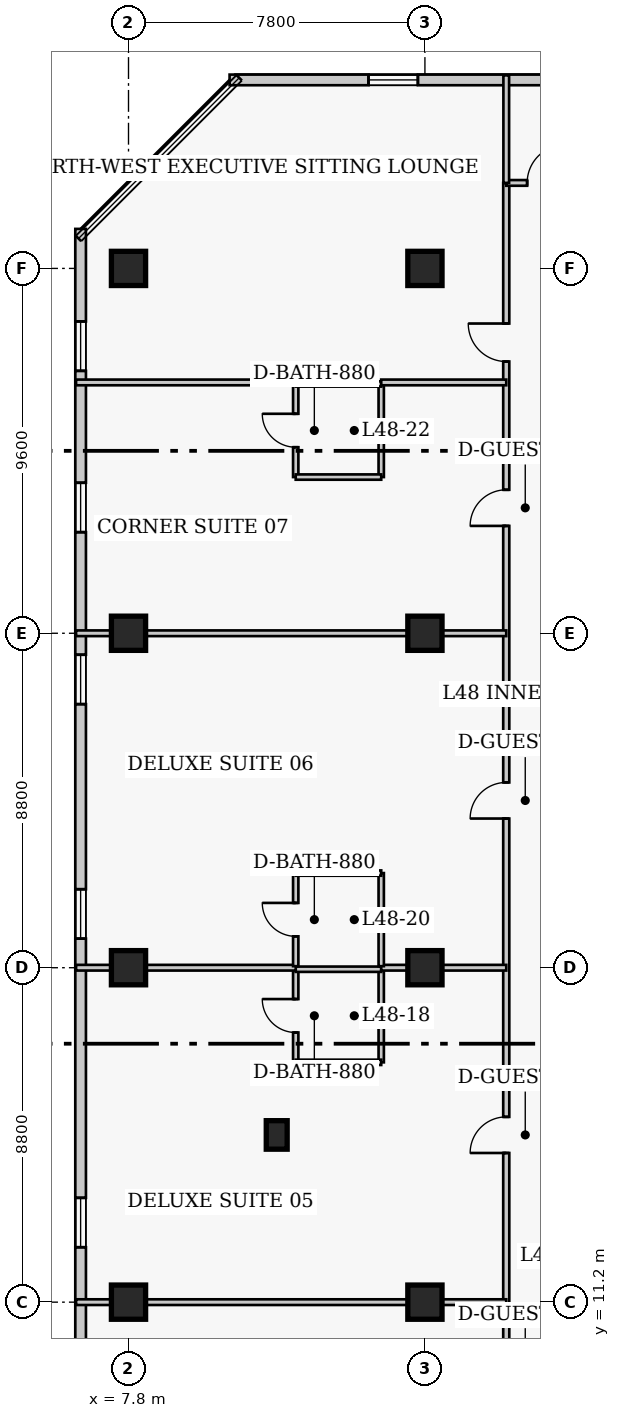
"""IFC4 building model, lengths in metres.
Left out: names, types, materials, properties, quantities, classifications, styles, units other than length and angle.
Written with IfcOpenShell. Run it as: python <this file> out.ifc"""

import sys

from ifc_helpers import new_model, si_unit, direction, frame, frame_2d, origin, origin_2d, place, context, subcontext, project, spatial, rectangle, extrude, element, fill, save


model = new_model("IFC4")
c1 = context("Model", 3, precision=1e-05, world=origin(), true_north=direction((0.0, 1.0)))
c2 = subcontext(c1, "Body", "Model", "MODEL_VIEW")
j1 = project(units=[si_unit("LENGTHUNIT", "METRE"), si_unit("PLANEANGLEUNIT", "RADIAN")], contexts=[c1])
p1 = place(None, origin())
s1 = spatial("IfcSite", under=j1, at=p1, CompositionType="ELEMENT")
p2 = place(p1, origin())
s2 = spatial("IfcBuilding", under=s1, at=p2, CompositionType="ELEMENT")
p3 = place(p2, frame((0.0, 0.0, 192.9)))
s3 = spatial("IfcBuildingStorey", under=s2, at=p3, CompositionType="ELEMENT", Elevation=192.9)
for number, where, z_axis, x_axis in (
    (1, (7.8, 11.2, 0.0), (0.0, 0.0, 1.0), (1.0, 0.0, 0.0)),
    (2, (7.8, 20.0, 0.0), (0.0, 0.0, 1.0), (1.0, 0.0, 0.0)),
    (3, (7.8, 28.8, 0.0), (0.0, 0.0, 1.0), (1.0, 0.0, 0.0)),
    (4, (7.8, 38.4, 0.0), (0.0, 0.0, 1.0), (1.0, 0.0, 0.0)),
    (5, (15.6, 11.2, 0.0), (0.0, 0.0, 1.0), (1.0, 0.0, 0.0)),
    (6, (15.6, 20.0, 0.0), (0.0, 0.0, 1.0), (1.0, 0.0, 0.0)),
    (7, (15.6, 28.8, 0.0), (0.0, 0.0, 1.0), (1.0, 0.0, 0.0)),
    (8, (15.6, 38.4, 0.0), (0.0, 0.0, 1.0), (1.0, 0.0, 0.0)),
):
    element("IfcColumn", number, at=place(p3, frame(where, z_axis=z_axis, x_axis=x_axis)), inside=s3, PredefinedType="COLUMN", context=c2, shape_type="SweptSolid", body=[
        extrude(rectangle(XDim=0.9, YDim=0.9, at=origin_2d()), origin(), (0.0, 0.0, 1.0), 3.9),
    ])
p4 = place(p3, frame((11.7, 15.6, 0.0), z_axis=(0.0, 0.0, 1.0), x_axis=(1.0, 0.0, 0.0)))
e9 = element("IfcColumn", 9, at=p4, inside=s3, PredefinedType="PILASTER", context=c2, shape_type="SweptSolid", body=[
    extrude(rectangle(XDim=0.55, YDim=0.75, at=origin_2d()), origin(), (0.0, 0.0, 1.0), 3.9),
])
p5 = place(p3, frame((36.29, 43.36, 0.0), z_axis=(0.0, 0.0, 1.0), x_axis=(-1.0, 0.0, 0.0)))
e10 = element("IfcWall", 10, at=p5, inside=s3, PredefinedType="SOLIDWALL", context=c2, shape_type="SweptSolid", body=[
    extrude(rectangle(XDim=25.83, YDim=0.28, at=frame_2d((12.915, 0.0))), origin(), (0.0, 0.0, 1.0), 3.65),
])
p6 = place(p5, frame((3.005, 0.0, 0.85)))
e11 = element("IfcOpeningElement", 11, at=p6, cuts=e10, PredefinedType="OPENING", context=c2, shape_type="SweptSolid", body=[
    extrude(rectangle(XDim=1.3, YDim=1.7, at=frame_2d((0.65, 0.85))), frame((0.0, 0.15, 0.0), z_axis=(0.0, -1.0, 0.0), x_axis=(1.0, 0.0, 0.0)), (0.0, 0.0, 1.0), 0.3),
])
p7 = place(p5, frame((12.265, 0.0, 0.85)))
e12 = element("IfcOpeningElement", 12, at=p7, cuts=e10, PredefinedType="OPENING", context=c2, shape_type="SweptSolid", body=[
    extrude(rectangle(XDim=1.3, YDim=1.7, at=frame_2d((0.65, 0.85))), frame((0.0, 0.15, 0.0), z_axis=(0.0, -1.0, 0.0), x_axis=(1.0, 0.0, 0.0)), (0.0, 0.0, 1.0), 0.3),
])
p8 = place(p5, frame((20.875, 0.0, 0.85)))
e13 = element("IfcOpeningElement", 13, at=p8, cuts=e10, PredefinedType="OPENING", context=c2, shape_type="SweptSolid", body=[
    extrude(rectangle(XDim=1.3, YDim=1.7, at=frame_2d((0.65, 0.85))), frame((0.0, 0.15, 0.0), z_axis=(0.0, -1.0, 0.0), x_axis=(1.0, 0.0, 0.0)), (0.0, 0.0, 1.0), 0.3),
])
p9 = place(p3, frame((6.54, 39.44, 0.0), z_axis=(0.0, 0.0, 1.0), x_axis=(0.0, -1.0, 0.0)))
e14 = element("IfcWall", 14, at=p9, inside=s3, PredefinedType="SOLIDWALL", context=c2, shape_type="SweptSolid", body=[
    extrude(rectangle(XDim=29.88, YDim=0.28, at=frame_2d((14.94, 0.0))), origin(), (0.0, 0.0, 1.0), 3.65),
])
p10 = place(p9, frame((2.435, 0.0, 0.85)))
e15 = element("IfcOpeningElement", 15, at=p10, cuts=e14, PredefinedType="OPENING", context=c2, shape_type="SweptSolid", body=[
    extrude(rectangle(XDim=1.3, YDim=1.7, at=frame_2d((0.65, 0.85))), frame((0.0, 0.15, 0.0), z_axis=(0.0, -1.0, 0.0), x_axis=(1.0, 0.0, 0.0)), (0.0, 0.0, 1.0), 0.3),
])
p11 = place(p9, frame((11.205, 0.0, 0.85)))
e16 = element("IfcOpeningElement", 16, at=p11, cuts=e14, PredefinedType="OPENING", context=c2, shape_type="SweptSolid", body=[
    extrude(rectangle(XDim=1.3, YDim=1.7, at=frame_2d((0.65, 0.85))), frame((0.0, 0.15, 0.0), z_axis=(0.0, -1.0, 0.0), x_axis=(1.0, 0.0, 0.0)), (0.0, 0.0, 1.0), 0.3),
])
p12 = place(p9, frame((17.375, 0.0, 0.85)))
e17 = element("IfcOpeningElement", 17, at=p12, cuts=e14, PredefinedType="OPENING", context=c2, shape_type="SweptSolid", body=[
    extrude(rectangle(XDim=1.3, YDim=1.7, at=frame_2d((0.65, 0.85))), frame((0.0, 0.15, 0.0), z_axis=(0.0, -1.0, 0.0), x_axis=(1.0, 0.0, 0.0)), (0.0, 0.0, 1.0), 0.3),
])
p13 = place(p9, frame((25.495, 0.0, 0.85)))
e18 = element("IfcOpeningElement", 18, at=p13, cuts=e14, PredefinedType="OPENING", context=c2, shape_type="SweptSolid", body=[
    extrude(rectangle(XDim=1.3, YDim=1.7, at=frame_2d((0.65, 0.85))), frame((0.0, 0.15, 0.0), z_axis=(0.0, -1.0, 0.0), x_axis=(1.0, 0.0, 0.0)), (0.0, 0.0, 1.0), 0.3),
])
p14 = place(p9, frame((6.68, 0.0, 0.85)))
e19 = element("IfcOpeningElement", 19, at=p14, cuts=e14, PredefinedType="OPENING", context=c2, shape_type="SweptSolid", body=[
    extrude(rectangle(XDim=1.3, YDim=1.7, at=frame_2d((0.65, 0.85))), frame((0.0, 0.15, 0.0), z_axis=(0.0, -1.0, 0.0), x_axis=(1.0, 0.0, 0.0)), (0.0, 0.0, 1.0), 0.3),
])
p15 = place(p3, frame((17.74, 7.55, 0.0), z_axis=(0.0, 0.0, 1.0), x_axis=(0.0, 1.0, 0.0)))
e20 = element("IfcWall", 20, at=p15, inside=s3, PredefinedType="PARTITIONING", context=c2, shape_type="SweptSolid", body=[
    extrude(rectangle(XDim=33.1, YDim=0.16, at=frame_2d((16.55, 0.0))), origin(), (0.0, 0.0, 1.0), 3.65),
])
p16 = place(p15, frame((1.35, 0.0, 0.0)))
e21 = element("IfcOpeningElement", 21, at=p16, cuts=e20, PredefinedType="OPENING", context=c2, shape_type="SweptSolid", body=[
    extrude(rectangle(XDim=0.95, YDim=2.1, at=frame_2d((0.475, 1.05))), frame((0.0, 0.09, 0.0), z_axis=(0.0, -1.0, 0.0), x_axis=(1.0, 0.0, 0.0)), (0.0, 0.0, 1.0), 0.18),
])
p17 = place(p15, frame((7.575, 0.0, 0.0)))
e22 = element("IfcOpeningElement", 22, at=p17, cuts=e20, PredefinedType="OPENING", context=c2, shape_type="SweptSolid", body=[
    extrude(rectangle(XDim=0.95, YDim=2.1, at=frame_2d((0.475, 1.05))), frame((0.0, 0.09, 0.0), z_axis=(0.0, -1.0, 0.0), x_axis=(1.0, 0.0, 0.0)), (0.0, 0.0, 1.0), 0.18),
])
p18 = place(p15, frame((16.375, 0.0, 0.0)))
e23 = element("IfcOpeningElement", 23, at=p18, cuts=e20, PredefinedType="OPENING", context=c2, shape_type="SweptSolid", body=[
    extrude(rectangle(XDim=0.95, YDim=2.1, at=frame_2d((0.475, 1.05))), frame((0.0, 0.09, 0.0), z_axis=(0.0, -1.0, 0.0), x_axis=(1.0, 0.0, 0.0)), (0.0, 0.0, 1.0), 0.18),
])
p19 = place(p15, frame((24.075, 0.0, 0.0)))
e24 = element("IfcOpeningElement", 24, at=p19, cuts=e20, PredefinedType="OPENING", context=c2, shape_type="SweptSolid", body=[
    extrude(rectangle(XDim=0.95, YDim=2.1, at=frame_2d((0.475, 1.05))), frame((0.0, 0.09, 0.0), z_axis=(0.0, -1.0, 0.0), x_axis=(1.0, 0.0, 0.0)), (0.0, 0.0, 1.0), 0.18),
])
p20 = place(p15, frame((28.4, 0.0, 0.0)))
e25 = element("IfcOpeningElement", 25, at=p20, cuts=e20, PredefinedType="OPENING", context=c2, shape_type="SweptSolid", body=[
    extrude(rectangle(XDim=1.0, YDim=2.15, at=frame_2d((0.5, 1.075))), frame((0.0, 0.09, 0.0), z_axis=(0.0, -1.0, 0.0), x_axis=(1.0, 0.0, 0.0)), (0.0, 0.0, 1.0), 0.18),
])
p21 = place(p3, frame((17.74, 40.65, 0.0), z_axis=(0.0, 0.0, 1.0), x_axis=(1.0, 0.0, 0.0)))
e26 = element("IfcWall", 26, at=p21, inside=s3, PredefinedType="PARTITIONING", context=c2, shape_type="SweptSolid", body=[
    extrude(rectangle(XDim=4.36, YDim=0.15, at=frame_2d((2.18, 0.0))), origin(), (0.0, 0.0, 1.0), 3.65),
])
p22 = place(p21, frame((0.55, 0.0, 0.0)))
e27 = element("IfcOpeningElement", 27, at=p22, cuts=e26, PredefinedType="OPENING", context=c2, shape_type="SweptSolid", body=[
    extrude(rectangle(XDim=1.0, YDim=2.15, at=frame_2d((0.5, 1.075))), frame((0.0, 0.085, 0.0), z_axis=(0.0, -1.0, 0.0), x_axis=(1.0, 0.0, 0.0)), (0.0, 0.0, 1.0), 0.17),
])
p23 = place(p3, frame((17.74, 40.65, 0.0), z_axis=(0.0, 0.0, 1.0), x_axis=(0.0, 1.0, 0.0)))
e28 = element("IfcWall", 28, at=p23, inside=s3, PredefinedType="PARTITIONING", context=c2, shape_type="SweptSolid", body=[
    extrude(rectangle(XDim=2.83, YDim=0.15, at=frame_2d((1.415, 0.0))), origin(), (0.0, 0.0, 1.0), 3.65),
])
p24 = place(p3, frame((6.42, 11.2, 0.0), z_axis=(0.0, 0.0, 1.0), x_axis=(1.0, 0.0, 0.0)))
e29 = element("IfcWall", 29, at=p24, inside=s3, PredefinedType="PARTITIONING", context=c2, shape_type="SweptSolid", body=[
    extrude(rectangle(XDim=11.32, YDim=0.15, at=frame_2d((5.66, 0.0))), origin(), (0.0, 0.0, 1.0), 2.878),
])
p25 = place(p3, frame((12.2, 17.51, 0.0), z_axis=(0.0, 0.0, 1.0), x_axis=(0.0, 1.0, 0.0)))
e30 = element("IfcWall", 30, at=p25, inside=s3, PredefinedType="PLUMBINGWALL", context=c2, shape_type="SweptSolid", body=[
    extrude(rectangle(XDim=2.45, YDim=0.14, at=frame_2d((1.225, 0.0))), origin(), (0.0, 0.0, 1.0), 3.65),
])
p26 = place(p25, frame((0.785, 0.0, 0.0)))
e31 = element("IfcOpeningElement", 31, at=p26, cuts=e30, PredefinedType="OPENING", context=c2, shape_type="SweptSolid", body=[
    extrude(rectangle(XDim=0.88, YDim=2.05, at=frame_2d((0.44, 1.025))), frame((0.0, 0.08, 0.0), z_axis=(0.0, -1.0, 0.0), x_axis=(1.0, 0.0, 0.0)), (0.0, 0.0, 1.0), 0.16),
])
p27 = place(p3, frame((14.45, 17.51, 0.0), z_axis=(0.0, 0.0, 1.0), x_axis=(0.0, 1.0, 0.0)))
e32 = element("IfcWall", 32, at=p27, inside=s3, PredefinedType="PLUMBINGWALL", context=c2, shape_type="SweptSolid", body=[
    extrude(rectangle(XDim=2.45, YDim=0.14, at=frame_2d((1.225, 0.0))), origin(), (0.0, 0.0, 1.0), 3.65),
])
p28 = place(p3, frame((12.2, 17.51, 0.0), z_axis=(0.0, 0.0, 1.0), x_axis=(1.0, 0.0, 0.0)))
e33 = element("IfcWall", 33, at=p28, inside=s3, PredefinedType="PLUMBINGWALL", context=c2, shape_type="SweptSolid", body=[
    extrude(rectangle(XDim=2.25, YDim=0.14, at=frame_2d((1.125, 0.0))), origin(), (0.0, 0.0, 1.0), 3.65),
])
p29 = place(p3, frame((12.2, 19.96, 0.0), z_axis=(0.0, 0.0, 1.0), x_axis=(1.0, 0.0, 0.0)))
e34 = element("IfcWall", 34, at=p29, inside=s3, PredefinedType="PLUMBINGWALL", context=c2, shape_type="SweptSolid", body=[
    extrude(rectangle(XDim=2.25, YDim=0.14, at=frame_2d((1.125, 0.0))), origin(), (0.0, 0.0, 1.0), 3.038),
])
p30 = place(p3, frame((6.42, 20.0, 0.0), z_axis=(0.0, 0.0, 1.0), x_axis=(1.0, 0.0, 0.0)))
e35 = element("IfcWall", 35, at=p30, inside=s3, PredefinedType="PARTITIONING", context=c2, shape_type="SweptSolid", body=[
    extrude(rectangle(XDim=5.78, YDim=0.15, at=frame_2d((2.89, 0.0))), origin(), (0.0, 0.0, 1.0), 2.878),
])
p31 = place(p3, frame((14.45, 20.0, 0.0), z_axis=(0.0, 0.0, 1.0), x_axis=(1.0, 0.0, 0.0)))
e36 = element("IfcWall", 36, at=p31, inside=s3, PredefinedType="PARTITIONING", context=c2, shape_type="SweptSolid", body=[
    extrude(rectangle(XDim=3.29, YDim=0.15, at=frame_2d((1.645, 0.0))), origin(), (0.0, 0.0, 1.0), 2.878),
])
p32 = place(p3, frame((12.2, 20.04, 0.0), z_axis=(0.0, 0.0, 1.0), x_axis=(0.0, 1.0, 0.0)))
e37 = element("IfcWall", 37, at=p32, inside=s3, PredefinedType="PLUMBINGWALL", context=c2, shape_type="SweptSolid", body=[
    extrude(rectangle(XDim=2.45, YDim=0.14, at=frame_2d((1.225, 0.0))), origin(), (0.0, 0.0, 1.0), 3.65),
])
p33 = place(p32, frame((0.785, 0.0, 0.0)))
e38 = element("IfcOpeningElement", 38, at=p33, cuts=e37, PredefinedType="OPENING", context=c2, shape_type="SweptSolid", body=[
    extrude(rectangle(XDim=0.88, YDim=2.05, at=frame_2d((0.44, 1.025))), frame((0.0, 0.08, 0.0), z_axis=(0.0, -1.0, 0.0), x_axis=(1.0, 0.0, 0.0)), (0.0, 0.0, 1.0), 0.16),
])
p34 = place(p3, frame((14.45, 20.04, 0.0), z_axis=(0.0, 0.0, 1.0), x_axis=(0.0, 1.0, 0.0)))
e39 = element("IfcWall", 39, at=p34, inside=s3, PredefinedType="PLUMBINGWALL", context=c2, shape_type="SweptSolid", body=[
    extrude(rectangle(XDim=2.45, YDim=0.14, at=frame_2d((1.225, 0.0))), origin(), (0.0, 0.0, 1.0), 3.65),
])
p35 = place(p3, frame((12.2, 22.49, 0.0), z_axis=(0.0, 0.0, 1.0), x_axis=(1.0, 0.0, 0.0)))
e40 = element("IfcWall", 40, at=p35, inside=s3, PredefinedType="PLUMBINGWALL", context=c2, shape_type="SweptSolid", body=[
    extrude(rectangle(XDim=2.25, YDim=0.14, at=frame_2d((1.125, 0.0))), origin(), (0.0, 0.0, 1.0), 3.65),
])
p36 = place(p3, frame((6.42, 28.8, 0.0), z_axis=(0.0, 0.0, 1.0), x_axis=(1.0, 0.0, 0.0)))
e41 = element("IfcWall", 41, at=p36, inside=s3, PredefinedType="PARTITIONING", context=c2, shape_type="SweptSolid", body=[
    extrude(rectangle(XDim=11.32, YDim=0.15, at=frame_2d((5.66, 0.0))), origin(), (0.0, 0.0, 1.0), 2.878),
])
p37 = place(p3, frame((12.2, 32.91, 0.0), z_axis=(0.0, 0.0, 1.0), x_axis=(0.0, 1.0, 0.0)))
e42 = element("IfcWall", 42, at=p37, inside=s3, PredefinedType="PLUMBINGWALL", context=c2, shape_type="SweptSolid", body=[
    extrude(rectangle(XDim=2.45, YDim=0.14, at=frame_2d((1.225, 0.0))), origin(), (0.0, 0.0, 1.0), 3.65),
])
p38 = place(p37, frame((0.785, 0.0, 0.0)))
e43 = element("IfcOpeningElement", 43, at=p38, cuts=e42, PredefinedType="OPENING", context=c2, shape_type="SweptSolid", body=[
    extrude(rectangle(XDim=0.88, YDim=2.05, at=frame_2d((0.44, 1.025))), frame((0.0, 0.08, 0.0), z_axis=(0.0, -1.0, 0.0), x_axis=(1.0, 0.0, 0.0)), (0.0, 0.0, 1.0), 0.16),
])
p39 = place(p3, frame((14.45, 32.91, 0.0), z_axis=(0.0, 0.0, 1.0), x_axis=(0.0, 1.0, 0.0)))
e44 = element("IfcWall", 44, at=p39, inside=s3, PredefinedType="PLUMBINGWALL", context=c2, shape_type="SweptSolid", body=[
    extrude(rectangle(XDim=2.45, YDim=0.14, at=frame_2d((1.225, 0.0))), origin(), (0.0, 0.0, 1.0), 3.65),
])
for number, where, z_axis, x_axis in (
    (45, (12.2, 32.91, 0.0), (0.0, 0.0, 1.0), (1.0, 0.0, 0.0)),
    (46, (12.2, 35.36, 0.0), (0.0, 0.0, 1.0), (1.0, 0.0, 0.0)),
):
    element("IfcWall", number, at=place(p3, frame(where, z_axis=z_axis, x_axis=x_axis)), inside=s3, PredefinedType="PLUMBINGWALL", context=c2, shape_type="SweptSolid", body=[
        extrude(rectangle(XDim=2.25, YDim=0.14, at=frame_2d((1.125, 0.0))), origin(), (0.0, 0.0, 1.0), 3.65),
    ])
p40 = place(p3, frame((6.42, 35.4, 0.0), z_axis=(0.0, 0.0, 1.0), x_axis=(1.0, 0.0, 0.0)))
e47 = element("IfcWall", 47, at=p40, inside=s3, PredefinedType="PARTITIONING", context=c2, shape_type="SweptSolid", body=[
    extrude(rectangle(XDim=5.78, YDim=0.15, at=frame_2d((2.89, 0.0))), origin(), (0.0, 0.0, 1.0), 3.65),
])
p41 = place(p3, frame((14.45, 35.4, 0.0), z_axis=(0.0, 0.0, 1.0), x_axis=(1.0, 0.0, 0.0)))
e48 = element("IfcWall", 48, at=p41, inside=s3, PredefinedType="PARTITIONING", context=c2, shape_type="SweptSolid", body=[
    extrude(rectangle(XDim=3.29, YDim=0.15, at=frame_2d((1.645, 0.0))), origin(), (0.0, 0.0, 1.0), 3.65),
])
p42 = place(p8, origin())
e49 = element("IfcWindow", 49, at=p42, inside=s3, PartitioningType="SINGLE_PANEL", PredefinedType="WINDOW", context=c2, shape_type="SweptSolid", body=[
    extrude(rectangle(XDim=1.3, YDim=1.7, at=frame_2d((0.65, 0.85))), frame((0.0, 0.03, 0.0), z_axis=(0.0, -1.0, 0.0), x_axis=(1.0, 0.0, 0.0)), (0.0, 0.0, 1.0), 0.06),
])
fill(e13, e49)
p43 = place(p10, origin())
e50 = element("IfcWindow", 50, at=p43, inside=s3, PartitioningType="SINGLE_PANEL", PredefinedType="WINDOW", context=c2, shape_type="SweptSolid", body=[
    extrude(rectangle(XDim=1.3, YDim=1.7, at=frame_2d((0.65, 0.85))), frame((0.0, 0.03, 0.0), z_axis=(0.0, -1.0, 0.0), x_axis=(1.0, 0.0, 0.0)), (0.0, 0.0, 1.0), 0.06),
])
fill(e15, e50)
p44 = place(p11, origin())
e51 = element("IfcWindow", 51, at=p44, inside=s3, PartitioningType="SINGLE_PANEL", PredefinedType="WINDOW", context=c2, shape_type="SweptSolid", body=[
    extrude(rectangle(XDim=1.3, YDim=1.7, at=frame_2d((0.65, 0.85))), frame((0.0, 0.03, 0.0), z_axis=(0.0, -1.0, 0.0), x_axis=(1.0, 0.0, 0.0)), (0.0, 0.0, 1.0), 0.06),
])
fill(e16, e51)
p45 = place(p12, origin())
e52 = element("IfcWindow", 52, at=p45, inside=s3, PartitioningType="SINGLE_PANEL", PredefinedType="WINDOW", context=c2, shape_type="SweptSolid", body=[
    extrude(rectangle(XDim=1.3, YDim=1.7, at=frame_2d((0.65, 0.85))), frame((0.0, 0.03, 0.0), z_axis=(0.0, -1.0, 0.0), x_axis=(1.0, 0.0, 0.0)), (0.0, 0.0, 1.0), 0.06),
])
fill(e17, e52)
p46 = place(p13, origin())
e53 = element("IfcWindow", 53, at=p46, inside=s3, PartitioningType="SINGLE_PANEL", PredefinedType="WINDOW", context=c2, shape_type="SweptSolid", body=[
    extrude(rectangle(XDim=1.3, YDim=1.7, at=frame_2d((0.65, 0.85))), frame((0.0, 0.03, 0.0), z_axis=(0.0, -1.0, 0.0), x_axis=(1.0, 0.0, 0.0)), (0.0, 0.0, 1.0), 0.06),
])
fill(e18, e53)
p47 = place(p14, origin())
e54 = element("IfcWindow", 54, at=p47, inside=s3, PartitioningType="SINGLE_PANEL", PredefinedType="WINDOW", context=c2, shape_type="SweptSolid", body=[
    extrude(rectangle(XDim=1.3, YDim=1.7, at=frame_2d((0.65, 0.85))), frame((0.0, 0.03, 0.0), z_axis=(0.0, -1.0, 0.0), x_axis=(1.0, 0.0, 0.0)), (0.0, 0.0, 1.0), 0.06),
])
fill(e19, e54)
p48 = place(p22, origin())
e55 = element("IfcDoor", 55, at=p48, inside=s3, OperationType="SINGLE_SWING_RIGHT", PredefinedType="DOOR", context=c2, shape_type="SweptSolid", body=[
    extrude(rectangle(XDim=1.0, YDim=2.15, at=frame_2d((0.5, 1.075))), frame((0.0, 0.025, 0.0), z_axis=(0.0, -1.0, 0.0), x_axis=(1.0, 0.0, 0.0)), (0.0, 0.0, 1.0), 0.05),
])
fill(e27, e55)
p49 = place(p26, origin())
e56 = element("IfcDoor", 56, at=p49, inside=s3, OperationType="SINGLE_SWING_RIGHT", PredefinedType="DOOR", context=c2, shape_type="SweptSolid", body=[
    extrude(rectangle(XDim=0.88, YDim=2.05, at=frame_2d((0.44, 1.025))), frame((0.0, 0.025, 0.0), z_axis=(0.0, -1.0, 0.0), x_axis=(1.0, 0.0, 0.0)), (0.0, 0.0, 1.0), 0.05),
])
fill(e31, e56)
p50 = place(p17, origin())
e57 = element("IfcDoor", 57, at=p50, inside=s3, OperationType="SINGLE_SWING_LEFT", PredefinedType="DOOR", context=c2, shape_type="SweptSolid", body=[
    extrude(rectangle(XDim=0.95, YDim=2.1, at=frame_2d((0.475, 1.05))), frame((0.0, 0.025, 0.0), z_axis=(0.0, -1.0, 0.0), x_axis=(1.0, 0.0, 0.0)), (0.0, 0.0, 1.0), 0.05),
])
fill(e22, e57)
p51 = place(p33, origin())
e58 = element("IfcDoor", 58, at=p51, inside=s3, OperationType="SINGLE_SWING_RIGHT", PredefinedType="DOOR", context=c2, shape_type="SweptSolid", body=[
    extrude(rectangle(XDim=0.88, YDim=2.05, at=frame_2d((0.44, 1.025))), frame((0.0, 0.025, 0.0), z_axis=(0.0, -1.0, 0.0), x_axis=(1.0, 0.0, 0.0)), (0.0, 0.0, 1.0), 0.05),
])
fill(e38, e58)
p52 = place(p18, origin())
e59 = element("IfcDoor", 59, at=p52, inside=s3, OperationType="SINGLE_SWING_LEFT", PredefinedType="DOOR", context=c2, shape_type="SweptSolid", body=[
    extrude(rectangle(XDim=0.95, YDim=2.1, at=frame_2d((0.475, 1.05))), frame((0.0, 0.025, 0.0), z_axis=(0.0, -1.0, 0.0), x_axis=(1.0, 0.0, 0.0)), (0.0, 0.0, 1.0), 0.05),
])
fill(e23, e59)
p53 = place(p38, origin())
e60 = element("IfcDoor", 60, at=p53, inside=s3, OperationType="SINGLE_SWING_RIGHT", PredefinedType="DOOR", context=c2, shape_type="SweptSolid", body=[
    extrude(rectangle(XDim=0.88, YDim=2.05, at=frame_2d((0.44, 1.025))), frame((0.0, 0.025, 0.0), z_axis=(0.0, -1.0, 0.0), x_axis=(1.0, 0.0, 0.0)), (0.0, 0.0, 1.0), 0.05),
])
fill(e43, e60)
p54 = place(p19, origin())
e61 = element("IfcDoor", 61, at=p54, inside=s3, OperationType="SINGLE_SWING_LEFT", PredefinedType="DOOR", context=c2, shape_type="SweptSolid", body=[
    extrude(rectangle(XDim=0.95, YDim=2.1, at=frame_2d((0.475, 1.05))), frame((0.0, 0.025, 0.0), z_axis=(0.0, -1.0, 0.0), x_axis=(1.0, 0.0, 0.0)), (0.0, 0.0, 1.0), 0.05),
])
fill(e24, e61)
p55 = place(p20, origin())
e62 = element("IfcDoor", 62, at=p55, inside=s3, OperationType="SINGLE_SWING_RIGHT", PredefinedType="DOOR", context=c2, shape_type="SweptSolid", body=[
    extrude(rectangle(XDim=1.0, YDim=2.15, at=frame_2d((0.5, 1.075))), frame((0.0, 0.025, 0.0), z_axis=(0.0, -1.0, 0.0), x_axis=(1.0, 0.0, 0.0)), (0.0, 0.0, 1.0), 0.05),
])
fill(e25, e62)
save(model, sys.argv[1])
